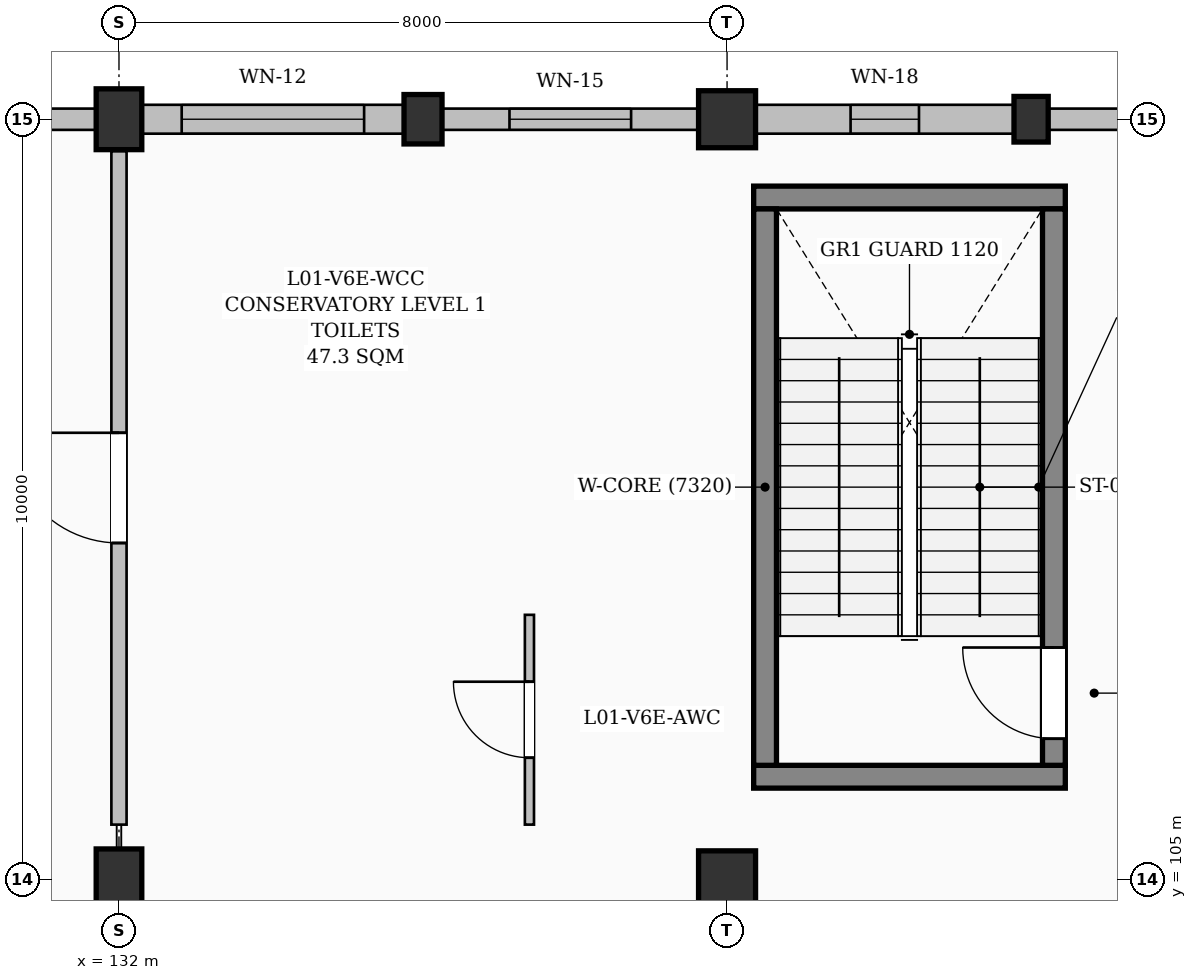
"""IFC4 building model, lengths in metres.
Left out: names, types, materials, properties, quantities, classifications, styles, units other than length and angle.
Written with IfcOpenShell. Run it as: python <this file> out.ifc"""

import sys

from ifc_helpers import new_model, si_unit, direction, frame, frame_2d, origin, origin_2d, place, context, subcontext, project, spatial, rectangle, extrude, element, fill, save


model = new_model("IFC4")
c1 = context("Model", 3, precision=1e-05, world=origin(), true_north=direction((0.0, 1.0)))
c2 = subcontext(c1, "Body", "Model", "MODEL_VIEW")
j1 = project(units=[si_unit("LENGTHUNIT", "METRE"), si_unit("PLANEANGLEUNIT", "RADIAN")], contexts=[c1])
p1 = place(None, origin())
s1 = spatial("IfcSite", under=j1, at=p1, CompositionType="ELEMENT")
p2 = place(p1, origin())
s2 = spatial("IfcBuilding", under=s1, at=p2, CompositionType="ELEMENT")
p3 = place(p2, frame((0.0, 0.0, 4.8)))
s3 = spatial("IfcBuildingStorey", under=s2, at=p3, CompositionType="ELEMENT", Elevation=4.8)
for number, where, z_axis, x_axis in (
    (1, (132.0, 105.0, 0.0), (0.0, 0.0, 1.0), (1.0, 0.0, 0.0)),
    (2, (132.0, 115.0, 0.0), (0.0, 0.0, 1.0), (1.0, 0.0, 0.0)),
):
    element("IfcColumn", number, at=place(p3, frame(where, z_axis=z_axis, x_axis=x_axis)), inside=s3, PredefinedType="COLUMN", context=c2, shape_type="SweptSolid", body=[
        extrude(rectangle(XDim=0.6, YDim=0.8, at=origin_2d()), origin(), (0.0, 0.0, 1.0), 4.5),
    ])
p4 = place(p3, frame((136.0, 115.0, 0.0), z_axis=(0.0, 0.0, 1.0), x_axis=(1.0, 0.0, 0.0)))
e3 = element("IfcColumn", 3, at=p4, inside=s3, PredefinedType="PILASTER", context=c2, shape_type="SweptSolid", body=[
    extrude(rectangle(XDim=0.5, YDim=0.65, at=origin_2d()), origin(), (0.0, 0.0, 1.0), 4.5),
])
for number, where, z_axis, x_axis in (
    (4, (140.0, 105.0, 0.0), (0.0, 0.0, 1.0), (1.0, 0.0, 0.0)),
    (5, (140.0, 115.0, 0.0), (0.0, 0.0, 1.0), (1.0, 0.0, 0.0)),
):
    element("IfcColumn", number, at=place(p3, frame(where, z_axis=z_axis, x_axis=x_axis)), inside=s3, PredefinedType="COLUMN", context=c2, shape_type="SweptSolid", body=[
        extrude(rectangle(XDim=0.75, YDim=0.75, at=origin_2d()), origin(), (0.0, 0.0, 1.0), 4.5),
    ])
p5 = place(p3, frame((144.0, 115.0, 0.0), z_axis=(0.0, 0.0, 1.0), x_axis=(1.0, 0.0, 0.0)))
e6 = element("IfcColumn", 6, at=p5, inside=s3, PredefinedType="PILASTER", context=c2, shape_type="SweptSolid", body=[
    extrude(rectangle(XDim=0.45, YDim=0.6, at=origin_2d()), origin(), (0.0, 0.0, 1.0), 4.5),
])
p6 = place(p3, frame((128.2, 115.0, 0.0), z_axis=(0.0, 0.0, 1.0), x_axis=(1.0, 0.0, 0.0)))
e7 = element("IfcWall", 7, at=p6, inside=s3, PredefinedType="SOLIDWALL", context=c2, shape_type="SweptSolid", body=[
    extrude(rectangle(XDim=3.5, YDim=0.28, at=frame_2d((1.75, 0.0))), origin(), (0.0, 0.0, 1.0), 3.685),
])
p7 = place(p6, frame((1.0, 0.0, 0.95)))
e8 = element("IfcOpeningElement", 8, at=p7, cuts=e7, PredefinedType="OPENING", context=c2, shape_type="SweptSolid", body=[
    extrude(rectangle(XDim=1.5, YDim=1.5, at=frame_2d((0.75, 0.75))), frame((0.0, 0.15, 0.0), z_axis=(0.0, -1.0, 0.0), x_axis=(1.0, 0.0, 0.0)), (0.0, 0.0, 1.0), 0.3),
])
p8 = place(p3, frame((132.3, 115.0, 0.0), z_axis=(0.0, 0.0, 1.0), x_axis=(1.0, 0.0, 0.0)))
e9 = element("IfcWall", 9, at=p8, inside=s3, PredefinedType="SOLIDWALL", context=c2, shape_type="SweptSolid", body=[
    extrude(rectangle(XDim=3.45, YDim=0.38, at=frame_2d((1.725, 0.0))), origin(), (0.0, 0.0, 1.0), 3.635),
])
p9 = place(p8, frame((0.525, 0.0, 0.95)))
e10 = element("IfcOpeningElement", 10, at=p9, cuts=e9, PredefinedType="OPENING", context=c2, shape_type="SweptSolid", body=[
    extrude(rectangle(XDim=2.4, YDim=1.5, at=frame_2d((1.2, 0.75))), frame((0.0, 0.2, 0.0), z_axis=(0.0, -1.0, 0.0), x_axis=(1.0, 0.0, 0.0)), (0.0, 0.0, 1.0), 0.4),
])
p10 = place(p3, frame((136.25, 115.0, 0.0), z_axis=(0.0, 0.0, 1.0), x_axis=(1.0, 0.0, 0.0)))
e11 = element("IfcWall", 11, at=p10, inside=s3, PredefinedType="SOLIDWALL", context=c2, shape_type="SweptSolid", body=[
    extrude(rectangle(XDim=3.375, YDim=0.28, at=frame_2d((1.688, 0.0))), origin(), (0.0, 0.0, 1.0), 3.635),
])
p11 = place(p10, frame((0.887, 0.0, 0.95)))
e12 = element("IfcOpeningElement", 12, at=p11, cuts=e11, PredefinedType="OPENING", context=c2, shape_type="SweptSolid", body=[
    extrude(rectangle(XDim=1.6, YDim=1.2, at=frame_2d((0.8, 0.6))), frame((0.0, 0.15, 0.0), z_axis=(0.0, -1.0, 0.0), x_axis=(1.0, 0.0, 0.0)), (0.0, 0.0, 1.0), 0.3),
])
p12 = place(p3, frame((140.375, 115.0, 0.0), z_axis=(0.0, 0.0, 1.0), x_axis=(1.0, 0.0, 0.0)))
e13 = element("IfcWall", 13, at=p12, inside=s3, PredefinedType="SOLIDWALL", context=c2, shape_type="SweptSolid", body=[
    extrude(rectangle(XDim=3.4, YDim=0.38, at=frame_2d((1.7, 0.0))), origin(), (0.0, 0.0, 1.0), 3.935),
])
p13 = place(p12, frame((1.25, 0.0, 0.95)))
e14 = element("IfcOpeningElement", 14, at=p13, cuts=e13, PredefinedType="OPENING", context=c2, shape_type="SweptSolid", body=[
    extrude(rectangle(XDim=0.9, YDim=1.8, at=frame_2d((0.45, 0.9))), frame((0.0, 0.2, 0.0), z_axis=(0.0, -1.0, 0.0), x_axis=(1.0, 0.0, 0.0)), (0.0, 0.0, 1.0), 0.4),
])
p14 = place(p3, frame((144.225, 115.0, 0.0), z_axis=(0.0, 0.0, 1.0), x_axis=(1.0, 0.0, 0.0)))
e15 = element("IfcWall", 15, at=p14, inside=s3, PredefinedType="SOLIDWALL", context=c2, shape_type="SweptSolid", body=[
    extrude(rectangle(XDim=3.4, YDim=0.28, at=frame_2d((1.7, 0.0))), origin(), (0.0, 0.0, 1.0), 3.935),
])
p15 = place(p14, frame((1.1, 0.0, 0.95)))
e16 = element("IfcOpeningElement", 16, at=p15, cuts=e15, PredefinedType="OPENING", context=c2, shape_type="SweptSolid", body=[
    extrude(rectangle(XDim=1.2, YDim=1.8, at=frame_2d((0.6, 0.9))), frame((0.0, 0.15, 0.0), z_axis=(0.0, -1.0, 0.0), x_axis=(1.0, 0.0, 0.0)), (0.0, 0.0, 1.0), 0.3),
])
for number, where, z_axis, x_axis in (
    (17, (140.35, 106.35, 0.0), (0.0, 0.0, 1.0), (1.0, 0.0, 0.0)),
    (18, (144.45, 113.97, 0.0), (0.0, 0.0, 1.0), (-1.0, 0.0, 0.0)),
):
    element("IfcWall", number, at=place(p3, frame(where, z_axis=z_axis, x_axis=x_axis)), inside=s3, PredefinedType="SHEAR", context=c2, shape_type="SweptSolid", body=[
        extrude(rectangle(XDim=4.1, YDim=0.3, at=frame_2d((2.05, 0.0))), origin(), (0.0, 0.0, 1.0), 4.25),
    ])
p16 = place(p3, frame((140.5, 106.5, 0.0), z_axis=(0.0, 0.0, 1.0), x_axis=(0.0, 1.0, 0.0)))
e19 = element("IfcWall", 19, at=p16, inside=s3, PredefinedType="SHEAR", context=c2, shape_type="SweptSolid", body=[
    extrude(rectangle(XDim=7.32, YDim=0.3, at=frame_2d((3.66, 0.0))), origin(), (0.0, 0.0, 1.0), 4.25),
])
p17 = place(p3, frame((144.3, 106.5, 0.0), z_axis=(0.0, 0.0, 1.0), x_axis=(0.0, 1.0, 0.0)))
e20 = element("IfcWall", 20, at=p17, inside=s3, PredefinedType="SHEAR", context=c2, shape_type="SweptSolid", body=[
    extrude(rectangle(XDim=7.32, YDim=0.3, at=frame_2d((3.66, 0.0))), origin(), (0.0, 0.0, 1.0), 4.25),
])
p18 = place(p17, frame((0.35, 0.0, 0.0)))
e21 = element("IfcOpeningElement", 21, at=p18, cuts=e20, PredefinedType="OPENING", context=c2, shape_type="SweptSolid", body=[
    extrude(rectangle(XDim=1.2, YDim=2.15, at=frame_2d((0.6, 1.075))), frame((0.0, 0.16, 0.0), z_axis=(0.0, -1.0, 0.0), x_axis=(1.0, 0.0, 0.0)), (0.0, 0.0, 1.0), 0.32),
])
p19 = place(p3, frame((132.0, 105.72, 0.0), z_axis=(0.0, 0.0, 1.0), x_axis=(0.0, 1.0, 0.0)))
e22 = element("IfcWall", 22, at=p19, inside=s3, PredefinedType="PARTITIONING", context=c2, shape_type="SweptSolid", body=[
    extrude(rectangle(XDim=8.86, YDim=0.2, at=frame_2d((4.43, 0.0))), origin(), (0.0, 0.0, 1.0), 3.875),
])
p20 = place(p19, frame((3.705, 0.0, 0.0)))
e23 = element("IfcOpeningElement", 23, at=p20, cuts=e22, PredefinedType="OPENING", context=c2, shape_type="SweptSolid", body=[
    extrude(rectangle(XDim=1.45, YDim=2.25, at=frame_2d((0.725, 1.125))), frame((0.0, 0.11, 0.0), z_axis=(0.0, -1.0, 0.0), x_axis=(1.0, 0.0, 0.0)), (0.0, 0.0, 1.0), 0.22),
])
p21 = place(p3, frame((137.4, 105.72, 0.0), z_axis=(0.0, 0.0, 1.0), x_axis=(0.0, 1.0, 0.0)))
e24 = element("IfcWall", 24, at=p21, inside=s3, PredefinedType="PARTITIONING", context=c2, shape_type="SweptSolid", body=[
    extrude(rectangle(XDim=2.76, YDim=0.12, at=frame_2d((1.38, 0.0))), origin(), (0.0, 0.0, 1.0), 4.25),
])
p22 = place(p21, frame((0.88, 0.0, 0.0)))
e25 = element("IfcOpeningElement", 25, at=p22, cuts=e24, PredefinedType="OPENING", context=c2, shape_type="SweptSolid", body=[
    extrude(rectangle(XDim=1.0, YDim=2.1, at=frame_2d((0.5, 1.05))), frame((0.0, 0.07, 0.0), z_axis=(0.0, -1.0, 0.0), x_axis=(1.0, 0.0, 0.0)), (0.0, 0.0, 1.0), 0.14),
])
p23 = place(p9, origin())
e26 = element("IfcWindow", 26, at=p23, inside=s3, PartitioningType="TRIPLE_PANEL_VERTICAL", PredefinedType="WINDOW", context=c2, shape_type="SweptSolid", body=[
    extrude(rectangle(XDim=2.4, YDim=1.5, at=frame_2d((1.2, 0.75))), frame((0.0, 0.03, 0.0), z_axis=(0.0, -1.0, 0.0), x_axis=(1.0, 0.0, 0.0)), (0.0, 0.0, 1.0), 0.06),
])
fill(e10, e26)
p24 = place(p11, origin())
e27 = element("IfcWindow", 27, at=p24, inside=s3, PartitioningType="DOUBLE_PANEL_HORIZONTAL", PredefinedType="WINDOW", context=c2, shape_type="SweptSolid", body=[
    extrude(rectangle(XDim=1.6, YDim=1.2, at=frame_2d((0.8, 0.6))), frame((0.0, 0.03, 0.0), z_axis=(0.0, -1.0, 0.0), x_axis=(1.0, 0.0, 0.0)), (0.0, 0.0, 1.0), 0.06),
])
fill(e12, e27)
p25 = place(p13, origin())
e28 = element("IfcWindow", 28, at=p25, inside=s3, PartitioningType="SINGLE_PANEL", PredefinedType="WINDOW", context=c2, shape_type="SweptSolid", body=[
    extrude(rectangle(XDim=0.9, YDim=1.8, at=frame_2d((0.45, 0.9))), frame((0.0, 0.03, 0.0), z_axis=(0.0, -1.0, 0.0), x_axis=(1.0, 0.0, 0.0)), (0.0, 0.0, 1.0), 0.06),
])
fill(e14, e28)
p26 = place(p18, origin())
e29 = element("IfcDoor", 29, at=p26, inside=s3, OperationType="SINGLE_SWING_RIGHT", PredefinedType="DOOR", context=c2, shape_type="SweptSolid", body=[
    extrude(rectangle(XDim=1.2, YDim=2.15, at=frame_2d((0.6, 1.075))), frame((0.0, 0.025, 0.0), z_axis=(0.0, -1.0, 0.0), x_axis=(1.0, 0.0, 0.0)), (0.0, 0.0, 1.0), 0.05),
])
fill(e21, e29)
p27 = place(p20, origin())
e30 = element("IfcDoor", 30, at=p27, inside=s3, OperationType="SINGLE_SWING_RIGHT", PredefinedType="DOOR", context=c2, shape_type="SweptSolid", body=[
    extrude(rectangle(XDim=1.45, YDim=2.25, at=frame_2d((0.725, 1.125))), frame((0.0, 0.025, 0.0), z_axis=(0.0, -1.0, 0.0), x_axis=(1.0, 0.0, 0.0)), (0.0, 0.0, 1.0), 0.05),
])
fill(e23, e30)
p28 = place(p22, origin())
e31 = element("IfcDoor", 31, at=p28, inside=s3, OperationType="SINGLE_SWING_RIGHT", PredefinedType="DOOR", context=c2, shape_type="SweptSolid", body=[
    extrude(rectangle(XDim=1.0, YDim=2.1, at=frame_2d((0.5, 1.05))), frame((0.0, 0.025, 0.0), z_axis=(0.0, -1.0, 0.0), x_axis=(1.0, 0.0, 0.0)), (0.0, 0.0, 1.0), 0.05),
])
fill(e25, e31)
save(model, sys.argv[1])
